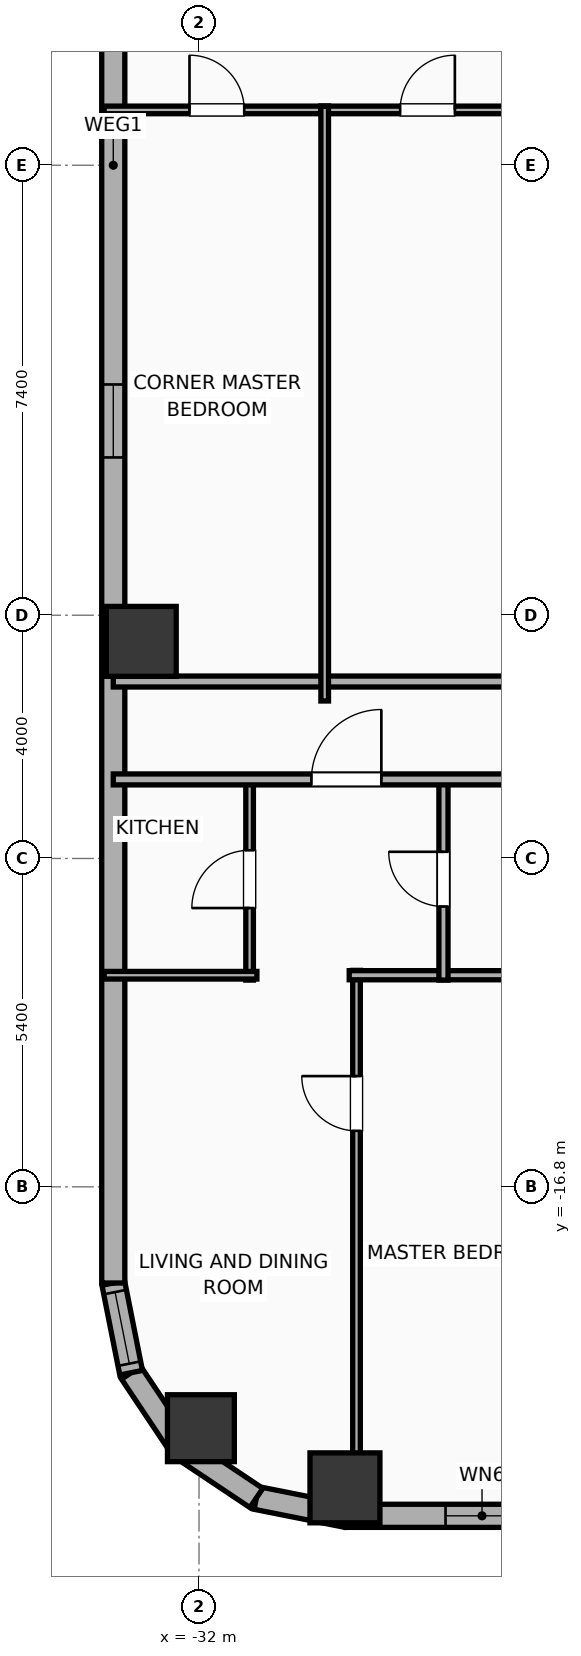
"""IFC4 building model, lengths in metres.
Left out: names, types, materials, properties, quantities, classifications, styles, units other than length and angle.
Written with IfcOpenShell. Run it as: python <this file> out.ifc"""

import sys

from ifc_helpers import new_model, si_unit, direction, frame, frame_2d, origin, origin_2d, place, context, subcontext, project, spatial, rectangle, hollow_rectangle, hollow_circle, extrude, element, fill, save


model = new_model("IFC4")
c1 = context("Model", 3, precision=1e-05, world=origin(), true_north=direction((0.0, 1.0)))
c2 = subcontext(c1, "Body", "Model", "MODEL_VIEW")
j1 = project(units=[si_unit("LENGTHUNIT", "METRE"), si_unit("PLANEANGLEUNIT", "RADIAN")], contexts=[c1])
p1 = place(None, origin())
s1 = spatial("IfcSite", under=j1, at=p1, CompositionType="ELEMENT")
p2 = place(p1, origin())
s2 = spatial("IfcBuilding", under=s1, at=p2, CompositionType="ELEMENT")
p3 = place(p2, frame((0.0, 0.0, 68.9)))
s3 = spatial("IfcBuildingStorey", under=s2, at=p3, CompositionType="ELEMENT", Elevation=68.9)
for number, where, z_axis, x_axis in (
    (1, (-29.6, -21.75, 0.0), (0.0, 0.0, 1.0), (1.0, 0.0, 0.0)),
    (2, (-32.95, -7.83, 0.0), (0.0, 0.0, 1.0), (1.0, 0.0, 0.0)),
):
    element("IfcColumn", number, at=place(p3, frame(where, z_axis=z_axis, x_axis=x_axis)), inside=s3, PredefinedType="COLUMN", context=c2, shape_type="SweptSolid", body=[
        extrude(hollow_rectangle(XDim=1.15, YDim=1.15, WallThickness=0.04, at=origin_2d()), origin(), (0.0, 0.0, 1.0), 3.9),
    ])
p4 = place(p3, frame((-31.969, -20.769, 0.0), z_axis=(0.0, 0.0, 1.0), x_axis=(1.0, 0.0, 0.0)))
e3 = element("IfcColumn", 3, at=p4, inside=s3, PredefinedType="COLUMN", context=c2, shape_type="SweptSolid", body=[
    extrude(hollow_circle(Radius=0.55, WallThickness=0.036, at=origin_2d()), origin(), (0.0, 0.0, 1.0), 3.9),
])
p5 = place(p3, frame((22.381, -22.21, 0.0), z_axis=(0.0, 0.0, 1.0), x_axis=(-1.0, 0.0, 0.0)))
e4 = element("IfcWall", 4, at=p5, inside=s3, PredefinedType="ELEMENTEDWALL", context=c2, shape_type="SweptSolid", body=[
    extrude(rectangle(XDim=51.963, YDim=0.38, at=frame_2d((25.981, 0.0))), origin(), (0.0, 0.0, 1.0), 3.65),
])
p6 = place(p5, frame((49.127, 0.0, 0.75)))
e5 = element("IfcOpeningElement", 5, at=p6, cuts=e4, PredefinedType="OPENING", context=c2, shape_type="SweptSolid", body=[
    extrude(rectangle(XDim=1.2, YDim=2.05, at=frame_2d((0.6, 1.025))), frame((0.0, 0.2, 0.0), z_axis=(0.0, -1.0, 0.0), x_axis=(1.0, 0.0, 0.0)), (0.0, 0.0, 1.0), 0.4),
])
p7 = place(p5, frame((43.926, 0.0, 0.75)))
e6 = element("IfcOpeningElement", 6, at=p7, cuts=e4, PredefinedType="OPENING", context=c2, shape_type="SweptSolid", body=[
    extrude(rectangle(XDim=1.2, YDim=2.05, at=frame_2d((0.6, 1.025))), frame((0.0, 0.2, 0.0), z_axis=(0.0, -1.0, 0.0), x_axis=(1.0, 0.0, 0.0)), (0.0, 0.0, 1.0), 0.4),
])
p8 = place(p5, frame((46.676, 0.0, 0.75)))
e7 = element("IfcOpeningElement", 7, at=p8, cuts=e4, PredefinedType="OPENING", context=c2, shape_type="SweptSolid", body=[
    extrude(rectangle(XDim=1.2, YDim=2.05, at=frame_2d((0.6, 1.025))), frame((0.0, 0.2, 0.0), z_axis=(0.0, -1.0, 0.0), x_axis=(1.0, 0.0, 0.0)), (0.0, 0.0, 1.0), 0.4),
])
p9 = place(p5, frame((39.531, 0.0, 0.75)))
e8 = element("IfcOpeningElement", 8, at=p9, cuts=e4, PredefinedType="OPENING", context=c2, shape_type="SweptSolid", body=[
    extrude(rectangle(XDim=1.2, YDim=2.05, at=frame_2d((0.6, 1.025))), frame((0.0, 0.2, 0.0), z_axis=(0.0, -1.0, 0.0), x_axis=(1.0, 0.0, 0.0)), (0.0, 0.0, 1.0), 0.4),
])
p10 = place(p5, frame((32.926, 0.0, 0.75)))
e9 = element("IfcOpeningElement", 9, at=p10, cuts=e4, PredefinedType="OPENING", context=c2, shape_type="SweptSolid", body=[
    extrude(rectangle(XDim=1.2, YDim=2.05, at=frame_2d((0.6, 1.025))), frame((0.0, 0.2, 0.0), z_axis=(0.0, -1.0, 0.0), x_axis=(1.0, 0.0, 0.0)), (0.0, 0.0, 1.0), 0.4),
])
p11 = place(p5, frame((35.676, 0.0, 0.75)))
e10 = element("IfcOpeningElement", 10, at=p11, cuts=e4, PredefinedType="OPENING", context=c2, shape_type="SweptSolid", body=[
    extrude(rectangle(XDim=1.2, YDim=2.05, at=frame_2d((0.6, 1.025))), frame((0.0, 0.2, 0.0), z_axis=(0.0, -1.0, 0.0), x_axis=(1.0, 0.0, 0.0)), (0.0, 0.0, 1.0), 0.4),
])
p12 = place(p5, frame((28.531, 0.0, 0.75)))
e11 = element("IfcOpeningElement", 11, at=p12, cuts=e4, PredefinedType="OPENING", context=c2, shape_type="SweptSolid", body=[
    extrude(rectangle(XDim=1.2, YDim=2.05, at=frame_2d((0.6, 1.025))), frame((0.0, 0.2, 0.0), z_axis=(0.0, -1.0, 0.0), x_axis=(1.0, 0.0, 0.0)), (0.0, 0.0, 1.0), 0.4),
])
p13 = place(p5, frame((21.926, 0.0, 0.75)))
e12 = element("IfcOpeningElement", 12, at=p13, cuts=e4, PredefinedType="OPENING", context=c2, shape_type="SweptSolid", body=[
    extrude(rectangle(XDim=1.2, YDim=2.05, at=frame_2d((0.6, 1.025))), frame((0.0, 0.2, 0.0), z_axis=(0.0, -1.0, 0.0), x_axis=(1.0, 0.0, 0.0)), (0.0, 0.0, 1.0), 0.4),
])
p14 = place(p5, frame((24.676, 0.0, 0.75)))
e13 = element("IfcOpeningElement", 13, at=p14, cuts=e4, PredefinedType="OPENING", context=c2, shape_type="SweptSolid", body=[
    extrude(rectangle(XDim=1.2, YDim=2.05, at=frame_2d((0.6, 1.025))), frame((0.0, 0.2, 0.0), z_axis=(0.0, -1.0, 0.0), x_axis=(1.0, 0.0, 0.0)), (0.0, 0.0, 1.0), 0.4),
])
p15 = place(p5, frame((18.636, 0.0, 0.75)))
e14 = element("IfcOpeningElement", 14, at=p15, cuts=e4, PredefinedType="OPENING", context=c2, shape_type="SweptSolid", body=[
    extrude(rectangle(XDim=1.2, YDim=2.05, at=frame_2d((0.6, 1.025))), frame((0.0, 0.2, 0.0), z_axis=(0.0, -1.0, 0.0), x_axis=(1.0, 0.0, 0.0)), (0.0, 0.0, 1.0), 0.4),
])
p16 = place(p5, frame((15.886, 0.0, 0.75)))
e15 = element("IfcOpeningElement", 15, at=p16, cuts=e4, PredefinedType="OPENING", context=c2, shape_type="SweptSolid", body=[
    extrude(rectangle(XDim=1.2, YDim=2.05, at=frame_2d((0.6, 1.025))), frame((0.0, 0.2, 0.0), z_axis=(0.0, -1.0, 0.0), x_axis=(1.0, 0.0, 0.0)), (0.0, 0.0, 1.0), 0.4),
])
p17 = place(p5, frame((12.031, 0.0, 0.75)))
e16 = element("IfcOpeningElement", 16, at=p17, cuts=e4, PredefinedType="OPENING", context=c2, shape_type="SweptSolid", body=[
    extrude(rectangle(XDim=1.2, YDim=2.05, at=frame_2d((0.6, 1.025))), frame((0.0, 0.2, 0.0), z_axis=(0.0, -1.0, 0.0), x_axis=(1.0, 0.0, 0.0)), (0.0, 0.0, 1.0), 0.4),
])
p18 = place(p5, frame((7.636, 0.0, 0.75)))
e17 = element("IfcOpeningElement", 17, at=p18, cuts=e4, PredefinedType="OPENING", context=c2, shape_type="SweptSolid", body=[
    extrude(rectangle(XDim=1.2, YDim=2.05, at=frame_2d((0.6, 1.025))), frame((0.0, 0.2, 0.0), z_axis=(0.0, -1.0, 0.0), x_axis=(1.0, 0.0, 0.0)), (0.0, 0.0, 1.0), 0.4),
])
p19 = place(p5, frame((4.886, 0.0, 0.75)))
e18 = element("IfcOpeningElement", 18, at=p19, cuts=e4, PredefinedType="OPENING", context=c2, shape_type="SweptSolid", body=[
    extrude(rectangle(XDim=1.2, YDim=2.05, at=frame_2d((0.6, 1.025))), frame((0.0, 0.2, 0.0), z_axis=(0.0, -1.0, 0.0), x_axis=(1.0, 0.0, 0.0)), (0.0, 0.0, 1.0), 0.4),
])
p20 = place(p5, frame((2.036, 0.0, 0.75)))
e19 = element("IfcOpeningElement", 19, at=p20, cuts=e4, PredefinedType="OPENING", context=c2, shape_type="SweptSolid", body=[
    extrude(rectangle(XDim=1.2, YDim=2.05, at=frame_2d((0.6, 1.025))), frame((0.0, 0.2, 0.0), z_axis=(0.0, -1.0, 0.0), x_axis=(1.0, 0.0, 0.0)), (0.0, 0.0, 1.0), 0.4),
])
p21 = place(p3, frame((-29.581, -22.21, 0.0), z_axis=(0.0, 0.0, 1.0), x_axis=(-0.980786132421, 0.195086038585, 0.0)))
e20 = element("IfcWall", 20, at=p21, inside=s3, PredefinedType="ELEMENTEDWALL", context=c2, shape_type="SweptSolid", body=[
    extrude(rectangle(XDim=1.504, YDim=0.38, at=frame_2d((0.752, 0.0))), origin(), (0.0, 0.0, 1.0), 3.65),
])
p22 = place(p3, frame((-31.057, -21.917, 0.0), z_axis=(0.0, 0.0, 1.0), x_axis=(-0.831442848281, 0.555610286119, 0.0)))
e21 = element("IfcWall", 21, at=p22, inside=s3, PredefinedType="ELEMENTEDWALL", context=c2, shape_type="SweptSolid", body=[
    extrude(rectangle(XDim=1.485, YDim=0.38, at=frame_2d((0.743, 0.0))), origin(), (0.0, 0.0, 1.0), 3.65),
])
p23 = place(p3, frame((-32.292, -21.091, 0.0), z_axis=(0.0, 0.0, 1.0), x_axis=(-0.555572577804, 0.831468045563, 0.0)))
e22 = element("IfcWall", 22, at=p23, inside=s3, PredefinedType="ELEMENTEDWALL", context=c2, shape_type="SweptSolid", body=[
    extrude(rectangle(XDim=1.485, YDim=0.38, at=frame_2d((0.742, 0.0))), origin(), (0.0, 0.0, 1.0), 3.65),
])
p24 = place(p3, frame((-33.116, -19.857, 0.0), z_axis=(0.0, 0.0, 1.0), x_axis=(-0.195086038585, 0.980786132421, 0.0)))
e23 = element("IfcWall", 23, at=p24, inside=s3, PredefinedType="ELEMENTEDWALL", context=c2, shape_type="SweptSolid", body=[
    extrude(rectangle(XDim=1.504, YDim=0.38, at=frame_2d((0.752, 0.0))), origin(), (0.0, 0.0, 1.0), 3.65),
])
p25 = place(p24, frame((0.152, 0.0, 0.75)))
e24 = element("IfcOpeningElement", 24, at=p25, cuts=e23, PredefinedType="OPENING", context=c2, shape_type="SweptSolid", body=[
    extrude(rectangle(XDim=1.2, YDim=2.05, at=frame_2d((0.6, 1.025))), frame((0.0, 0.2, 0.0), z_axis=(0.0, -1.0, 0.0), x_axis=(1.0, 0.0, 0.0)), (0.0, 0.0, 1.0), 0.4),
])
p26 = place(p3, frame((-33.41, -18.381, 0.0), z_axis=(0.0, 0.0, 1.0), x_axis=(0.0, 1.0, 0.0)))
e25 = element("IfcWall", 25, at=p26, inside=s3, PredefinedType="ELEMENTEDWALL", context=c2, shape_type="SweptSolid", body=[
    extrude(rectangle(XDim=36.763, YDim=0.38, at=frame_2d((18.381, 0.0))), origin(), (0.0, 0.0, 1.0), 3.65),
])
p27 = place(p26, frame((32.857, 0.0, 0.75)))
e26 = element("IfcOpeningElement", 26, at=p27, cuts=e25, PredefinedType="OPENING", context=c2, shape_type="SweptSolid", body=[
    extrude(rectangle(XDim=1.2, YDim=2.05, at=frame_2d((0.6, 1.025))), frame((0.0, 0.2, 0.0), z_axis=(0.0, -1.0, 0.0), x_axis=(1.0, 0.0, 0.0)), (0.0, 0.0, 1.0), 0.4),
])
p28 = place(p26, frame((22.126, 0.0, 0.75)))
e27 = element("IfcOpeningElement", 27, at=p28, cuts=e25, PredefinedType="OPENING", context=c2, shape_type="SweptSolid", body=[
    extrude(rectangle(XDim=1.2, YDim=2.05, at=frame_2d((0.6, 1.025))), frame((0.0, 0.2, 0.0), z_axis=(0.0, -1.0, 0.0), x_axis=(1.0, 0.0, 0.0)), (0.0, 0.0, 1.0), 0.4),
])
p29 = place(p26, frame((13.576, 0.0, 0.75)))
e28 = element("IfcOpeningElement", 28, at=p29, cuts=e25, PredefinedType="OPENING", context=c2, shape_type="SweptSolid", body=[
    extrude(rectangle(XDim=1.2, YDim=2.05, at=frame_2d((0.6, 1.025))), frame((0.0, 0.2, 0.0), z_axis=(0.0, -1.0, 0.0), x_axis=(1.0, 0.0, 0.0)), (0.0, 0.0, 1.0), 0.4),
])
p30 = place(p3, frame((-33.41, -8.49, 0.0), z_axis=(0.0, 0.0, 1.0), x_axis=(1.0, 0.0, 0.0)))
e29 = element("IfcWall", 29, at=p30, inside=s3, PredefinedType="PARTITIONING", context=c2, shape_type="SweptSolid", body=[
    extrude(rectangle(XDim=23.53, YDim=0.18, at=frame_2d((11.765, 0.0))), origin(), (0.0, 0.0, 1.0), 3.65),
])
p31 = place(p3, frame((-29.41, -22.36, 0.0), z_axis=(0.0, 0.0, 1.0), x_axis=(0.0, 1.0, 0.0)))
e30 = element("IfcWall", 30, at=p31, inside=s3, PredefinedType="PARTITIONING", context=c2, shape_type="SweptSolid", body=[
    extrude(rectangle(XDim=9.12, YDim=0.125, at=frame_2d((4.56, 0.0))), origin(), (0.0, 0.0, 1.0), 3.65),
])
p32 = place(p31, frame((6.481, 0.0, 0.0)))
e31 = element("IfcOpeningElement", 31, at=p32, cuts=e30, PredefinedType="OPENING", context=c2, shape_type="SweptSolid", body=[
    extrude(rectangle(XDim=0.9, YDim=2.05, at=frame_2d((0.45, 1.025))), frame((0.0, 0.073, 0.0), z_axis=(0.0, -1.0, 0.0), x_axis=(1.0, 0.0, 0.0)), (0.0, 0.0, 1.0), 0.145),
])
p33 = place(p3, frame((-29.53, -13.32, 0.0), z_axis=(0.0, 0.0, 1.0), x_axis=(1.0, 0.0, 0.0)))
e32 = element("IfcWall", 32, at=p33, inside=s3, PredefinedType="PLUMBINGWALL", context=c2, shape_type="SweptSolid", body=[
    extrude(rectangle(XDim=3.79, YDim=0.15, at=frame_2d((1.895, 0.0))), origin(), (0.0, 0.0, 1.0), 3.65),
])
p34 = place(p3, frame((-31.168, -13.4, 0.0), z_axis=(0.0, 0.0, 1.0), x_axis=(0.0, 1.0, 0.0)))
e33 = element("IfcWall", 33, at=p34, inside=s3, PredefinedType="PARTITIONING", context=c2, shape_type="SweptSolid", body=[
    extrude(rectangle(XDim=3.32, YDim=0.125, at=frame_2d((1.66, 0.0))), origin(), (0.0, 0.0, 1.0), 3.65),
])
p35 = place(p34, frame((1.185, 0.0, 0.0)))
e34 = element("IfcOpeningElement", 34, at=p35, cuts=e33, PredefinedType="OPENING", context=c2, shape_type="SweptSolid", body=[
    extrude(rectangle(XDim=0.95, YDim=2.05, at=frame_2d((0.475, 1.025))), frame((0.0, 0.073, 0.0), z_axis=(0.0, -1.0, 0.0), x_axis=(1.0, 0.0, 0.0)), (0.0, 0.0, 1.0), 0.145),
])
p36 = place(p3, frame((-33.56, -13.32, 0.0), z_axis=(0.0, 0.0, 1.0), x_axis=(1.0, 0.0, 0.0)))
e35 = element("IfcWall", 35, at=p36, inside=s3, PredefinedType="PARTITIONING", context=c2, shape_type="SweptSolid", body=[
    extrude(rectangle(XDim=2.512, YDim=0.125, at=frame_2d((1.256, 0.0))), origin(), (0.0, 0.0, 1.0), 3.65),
])
p37 = place(p3, frame((-27.98, -13.4, 0.0), z_axis=(0.0, 0.0, 1.0), x_axis=(0.0, 1.0, 0.0)))
e36 = element("IfcWall", 36, at=p37, inside=s3, PredefinedType="PLUMBINGWALL", context=c2, shape_type="SweptSolid", body=[
    extrude(rectangle(XDim=3.32, YDim=0.15, at=frame_2d((1.66, 0.0))), origin(), (0.0, 0.0, 1.0), 3.65),
])
p38 = place(p37, frame((1.21, 0.0, 0.0)))
e37 = element("IfcOpeningElement", 37, at=p38, cuts=e36, PredefinedType="OPENING", context=c2, shape_type="SweptSolid", body=[
    extrude(rectangle(XDim=0.9, YDim=2.05, at=frame_2d((0.45, 1.025))), frame((0.0, 0.085, 0.0), z_axis=(0.0, -1.0, 0.0), x_axis=(1.0, 0.0, 0.0)), (0.0, 0.0, 1.0), 0.17),
])
p39 = place(p3, frame((-33.41, -10.1, 0.0), z_axis=(0.0, 0.0, 1.0), x_axis=(1.0, 0.0, 0.0)))
e38 = element("IfcWall", 38, at=p39, inside=s3, PredefinedType="PARTITIONING", context=c2, shape_type="SweptSolid", body=[
    extrude(rectangle(XDim=59.62, YDim=0.18, at=frame_2d((29.81, 0.0))), origin(), (0.0, 0.0, 1.0), 3.65),
])
p40 = place(p39, frame((3.259, 0.0, 0.0)))
e39 = element("IfcOpeningElement", 39, at=p40, cuts=e38, PredefinedType="OPENING", context=c2, shape_type="SweptSolid", body=[
    extrude(rectangle(XDim=1.15, YDim=2.05, at=frame_2d((0.575, 1.025))), frame((0.0, 0.1, 0.0), z_axis=(0.0, -1.0, 0.0), x_axis=(1.0, 0.0, 0.0)), (0.0, 0.0, 1.0), 0.2),
])
p41 = place(p39, frame((10.657, 0.0, 0.0)))
e40 = element("IfcOpeningElement", 40, at=p41, cuts=e38, PredefinedType="OPENING", context=c2, shape_type="SweptSolid", body=[
    extrude(rectangle(XDim=1.15, YDim=2.05, at=frame_2d((0.575, 1.025))), frame((0.0, 0.1, 0.0), z_axis=(0.0, -1.0, 0.0), x_axis=(1.0, 0.0, 0.0)), (0.0, 0.0, 1.0), 0.2),
])
p42 = place(p39, frame((15.421, 0.0, 0.0)))
e41 = element("IfcOpeningElement", 41, at=p42, cuts=e38, PredefinedType="OPENING", context=c2, shape_type="SweptSolid", body=[
    extrude(rectangle(XDim=0.9, YDim=2.05, at=frame_2d((0.45, 1.025))), frame((0.0, 0.1, 0.0), z_axis=(0.0, -1.0, 0.0), x_axis=(1.0, 0.0, 0.0)), (0.0, 0.0, 1.0), 0.2),
])
p43 = place(p39, frame((21.657, 0.0, 0.0)))
e42 = element("IfcOpeningElement", 42, at=p43, cuts=e38, PredefinedType="OPENING", context=c2, shape_type="SweptSolid", body=[
    extrude(rectangle(XDim=1.15, YDim=2.05, at=frame_2d((0.575, 1.025))), frame((0.0, 0.1, 0.0), z_axis=(0.0, -1.0, 0.0), x_axis=(1.0, 0.0, 0.0)), (0.0, 0.0, 1.0), 0.2),
])
p44 = place(p39, frame((26.421, 0.0, 0.0)))
e43 = element("IfcOpeningElement", 43, at=p44, cuts=e38, PredefinedType="OPENING", context=c2, shape_type="SweptSolid", body=[
    extrude(rectangle(XDim=0.9, YDim=2.05, at=frame_2d((0.45, 1.025))), frame((0.0, 0.1, 0.0), z_axis=(0.0, -1.0, 0.0), x_axis=(1.0, 0.0, 0.0)), (0.0, 0.0, 1.0), 0.2),
])
p45 = place(p39, frame((32.657, 0.0, 0.0)))
e44 = element("IfcOpeningElement", 44, at=p45, cuts=e38, PredefinedType="OPENING", context=c2, shape_type="SweptSolid", body=[
    extrude(rectangle(XDim=1.15, YDim=2.05, at=frame_2d((0.575, 1.025))), frame((0.0, 0.1, 0.0), z_axis=(0.0, -1.0, 0.0), x_axis=(1.0, 0.0, 0.0)), (0.0, 0.0, 1.0), 0.2),
])
p46 = place(p39, frame((36.008, 0.0, 0.0)))
e45 = element("IfcOpeningElement", 45, at=p46, cuts=e38, PredefinedType="OPENING", context=c2, shape_type="SweptSolid", body=[
    extrude(rectangle(XDim=1.15, YDim=2.05, at=frame_2d((0.575, 1.025))), frame((0.0, 0.1, 0.0), z_axis=(0.0, -1.0, 0.0), x_axis=(1.0, 0.0, 0.0)), (0.0, 0.0, 1.0), 0.2),
])
p47 = place(p39, frame((42.917, 0.0, 0.0)))
e46 = element("IfcOpeningElement", 46, at=p47, cuts=e38, PredefinedType="OPENING", context=c2, shape_type="SweptSolid", body=[
    extrude(rectangle(XDim=0.9, YDim=2.05, at=frame_2d((0.45, 1.025))), frame((0.0, 0.1, 0.0), z_axis=(0.0, -1.0, 0.0), x_axis=(1.0, 0.0, 0.0)), (0.0, 0.0, 1.0), 0.2),
])
p48 = place(p39, frame((47.008, 0.0, 0.0)))
e47 = element("IfcOpeningElement", 47, at=p48, cuts=e38, PredefinedType="OPENING", context=c2, shape_type="SweptSolid", body=[
    extrude(rectangle(XDim=1.15, YDim=2.05, at=frame_2d((0.575, 1.025))), frame((0.0, 0.1, 0.0), z_axis=(0.0, -1.0, 0.0), x_axis=(1.0, 0.0, 0.0)), (0.0, 0.0, 1.0), 0.2),
])
p49 = place(p39, frame((55.14, 0.0, 0.0)))
e48 = element("IfcOpeningElement", 48, at=p49, cuts=e38, PredefinedType="OPENING", context=c2, shape_type="SweptSolid", body=[
    extrude(rectangle(XDim=1.15, YDim=2.05, at=frame_2d((0.575, 1.025))), frame((0.0, 0.1, 0.0), z_axis=(0.0, -1.0, 0.0), x_axis=(1.0, 0.0, 0.0)), (0.0, 0.0, 1.0), 0.2),
])
p50 = place(p3, frame((-33.56, 0.91, 0.0), z_axis=(0.0, 0.0, 1.0), x_axis=(1.0, 0.0, 0.0)))
e49 = element("IfcWall", 49, at=p50, inside=s3, PredefinedType="PARTITIONING", context=c2, shape_type="SweptSolid", body=[
    extrude(rectangle(XDim=3.689, YDim=0.125, at=frame_2d((1.845, 0.0))), origin(), (0.0, 0.0, 1.0), 3.65),
])
p51 = place(p50, frame((1.404, 0.0, 0.0)))
e50 = element("IfcOpeningElement", 50, at=p51, cuts=e49, PredefinedType="OPENING", context=c2, shape_type="SweptSolid", body=[
    extrude(rectangle(XDim=0.9, YDim=2.05, at=frame_2d((0.45, 1.025))), frame((0.0, 0.073, 0.0), z_axis=(0.0, -1.0, 0.0), x_axis=(1.0, 0.0, 0.0)), (0.0, 0.0, 1.0), 0.145),
])
p52 = place(p3, frame((-29.996, 0.91, 0.0), z_axis=(0.0, 0.0, 1.0), x_axis=(1.0, 0.0, 0.0)))
e51 = element("IfcWall", 51, at=p52, inside=s3, PredefinedType="PARTITIONING", context=c2, shape_type="SweptSolid", body=[
    extrude(rectangle(XDim=3.506, YDim=0.125, at=frame_2d((1.753, 0.0))), origin(), (0.0, 0.0, 1.0), 3.65),
])
p53 = place(p52, frame((1.303, 0.0, 0.0)))
e52 = element("IfcOpeningElement", 52, at=p53, cuts=e51, PredefinedType="OPENING", context=c2, shape_type="SweptSolid", body=[
    extrude(rectangle(XDim=0.9, YDim=2.05, at=frame_2d((0.45, 1.025))), frame((0.0, 0.073, 0.0), z_axis=(0.0, -1.0, 0.0), x_axis=(1.0, 0.0, 0.0)), (0.0, 0.0, 1.0), 0.145),
])
p54 = place(p3, frame((-29.933, -8.81, 0.0), z_axis=(0.0, 0.0, 1.0), x_axis=(0.0, 1.0, 0.0)))
e53 = element("IfcWall", 53, at=p54, inside=s3, PredefinedType="PARTITIONING", context=c2, shape_type="SweptSolid", body=[
    extrude(rectangle(XDim=9.78, YDim=0.125, at=frame_2d((4.89, 0.0))), origin(), (0.0, 0.0, 1.0), 3.65),
])
p55 = place(p25, origin())
e54 = element("IfcWindow", 54, at=p55, inside=s3, PartitioningType="SINGLE_PANEL", PredefinedType="WINDOW", context=c2, shape_type="SweptSolid", body=[
    extrude(rectangle(XDim=1.2, YDim=2.05, at=frame_2d((0.6, 1.025))), frame((0.0, 0.03, 0.0), z_axis=(0.0, -1.0, 0.0), x_axis=(1.0, 0.0, 0.0)), (0.0, 0.0, 1.0), 0.06),
])
fill(e24, e54)
p56 = place(p6, origin())
e55 = element("IfcWindow", 55, at=p56, inside=s3, PartitioningType="SINGLE_PANEL", PredefinedType="WINDOW", context=c2, shape_type="SweptSolid", body=[
    extrude(rectangle(XDim=1.2, YDim=2.05, at=frame_2d((0.6, 1.025))), frame((0.0, 0.03, 0.0), z_axis=(0.0, -1.0, 0.0), x_axis=(1.0, 0.0, 0.0)), (0.0, 0.0, 1.0), 0.06),
])
fill(e5, e55)
p57 = place(p29, origin())
e56 = element("IfcWindow", 56, at=p57, inside=s3, PartitioningType="SINGLE_PANEL", PredefinedType="WINDOW", context=c2, shape_type="SweptSolid", body=[
    extrude(rectangle(XDim=1.2, YDim=2.05, at=frame_2d((0.6, 1.025))), frame((0.0, 0.03, 0.0), z_axis=(0.0, -1.0, 0.0), x_axis=(1.0, 0.0, 0.0)), (0.0, 0.0, 1.0), 0.06),
])
fill(e28, e56)
p58 = place(p32, origin())
e57 = element("IfcDoor", 57, at=p58, inside=s3, OperationType="SINGLE_SWING_RIGHT", PredefinedType="DOOR", context=c2, shape_type="SweptSolid", body=[
    extrude(rectangle(XDim=0.9, YDim=2.05, at=frame_2d((0.45, 1.025))), frame((0.0, 0.025, 0.0), z_axis=(0.0, -1.0, 0.0), x_axis=(1.0, 0.0, 0.0)), (0.0, 0.0, 1.0), 0.05),
])
fill(e31, e57)
p59 = place(p35, origin())
e58 = element("IfcDoor", 58, at=p59, inside=s3, OperationType="SINGLE_SWING_LEFT", PredefinedType="DOOR", context=c2, shape_type="SweptSolid", body=[
    extrude(rectangle(XDim=0.95, YDim=2.05, at=frame_2d((0.475, 1.025))), frame((0.0, 0.025, 0.0), z_axis=(0.0, -1.0, 0.0), x_axis=(1.0, 0.0, 0.0)), (0.0, 0.0, 1.0), 0.05),
])
fill(e34, e58)
p60 = place(p38, origin())
e59 = element("IfcDoor", 59, at=p60, inside=s3, OperationType="SINGLE_SWING_RIGHT", PredefinedType="DOOR", context=c2, shape_type="SweptSolid", body=[
    extrude(rectangle(XDim=0.9, YDim=2.05, at=frame_2d((0.45, 1.025))), frame((0.0, 0.025, 0.0), z_axis=(0.0, -1.0, 0.0), x_axis=(1.0, 0.0, 0.0)), (0.0, 0.0, 1.0), 0.05),
])
fill(e37, e59)
p61 = place(p40, origin())
e60 = element("IfcDoor", 60, at=p61, inside=s3, OperationType="SINGLE_SWING_RIGHT", PredefinedType="DOOR", context=c2, shape_type="SweptSolid", body=[
    extrude(rectangle(XDim=1.15, YDim=2.05, at=frame_2d((0.575, 1.025))), frame((0.0, 0.025, 0.0), z_axis=(0.0, -1.0, 0.0), x_axis=(1.0, 0.0, 0.0)), (0.0, 0.0, 1.0), 0.05),
])
fill(e39, e60)
p62 = place(p51, origin())
e61 = element("IfcDoor", 61, at=p62, inside=s3, OperationType="SINGLE_SWING_LEFT", PredefinedType="DOOR", context=c2, shape_type="SweptSolid", body=[
    extrude(rectangle(XDim=0.9, YDim=2.05, at=frame_2d((0.45, 1.025))), frame((0.0, 0.025, 0.0), z_axis=(0.0, -1.0, 0.0), x_axis=(1.0, 0.0, 0.0)), (0.0, 0.0, 1.0), 0.05),
])
fill(e50, e61)
p63 = place(p53, origin())
e62 = element("IfcDoor", 62, at=p63, inside=s3, OperationType="SINGLE_SWING_RIGHT", PredefinedType="DOOR", context=c2, shape_type="SweptSolid", body=[
    extrude(rectangle(XDim=0.9, YDim=2.05, at=frame_2d((0.45, 1.025))), frame((0.0, 0.025, 0.0), z_axis=(0.0, -1.0, 0.0), x_axis=(1.0, 0.0, 0.0)), (0.0, 0.0, 1.0), 0.05),
])
fill(e52, e62)
save(model, sys.argv[1])
